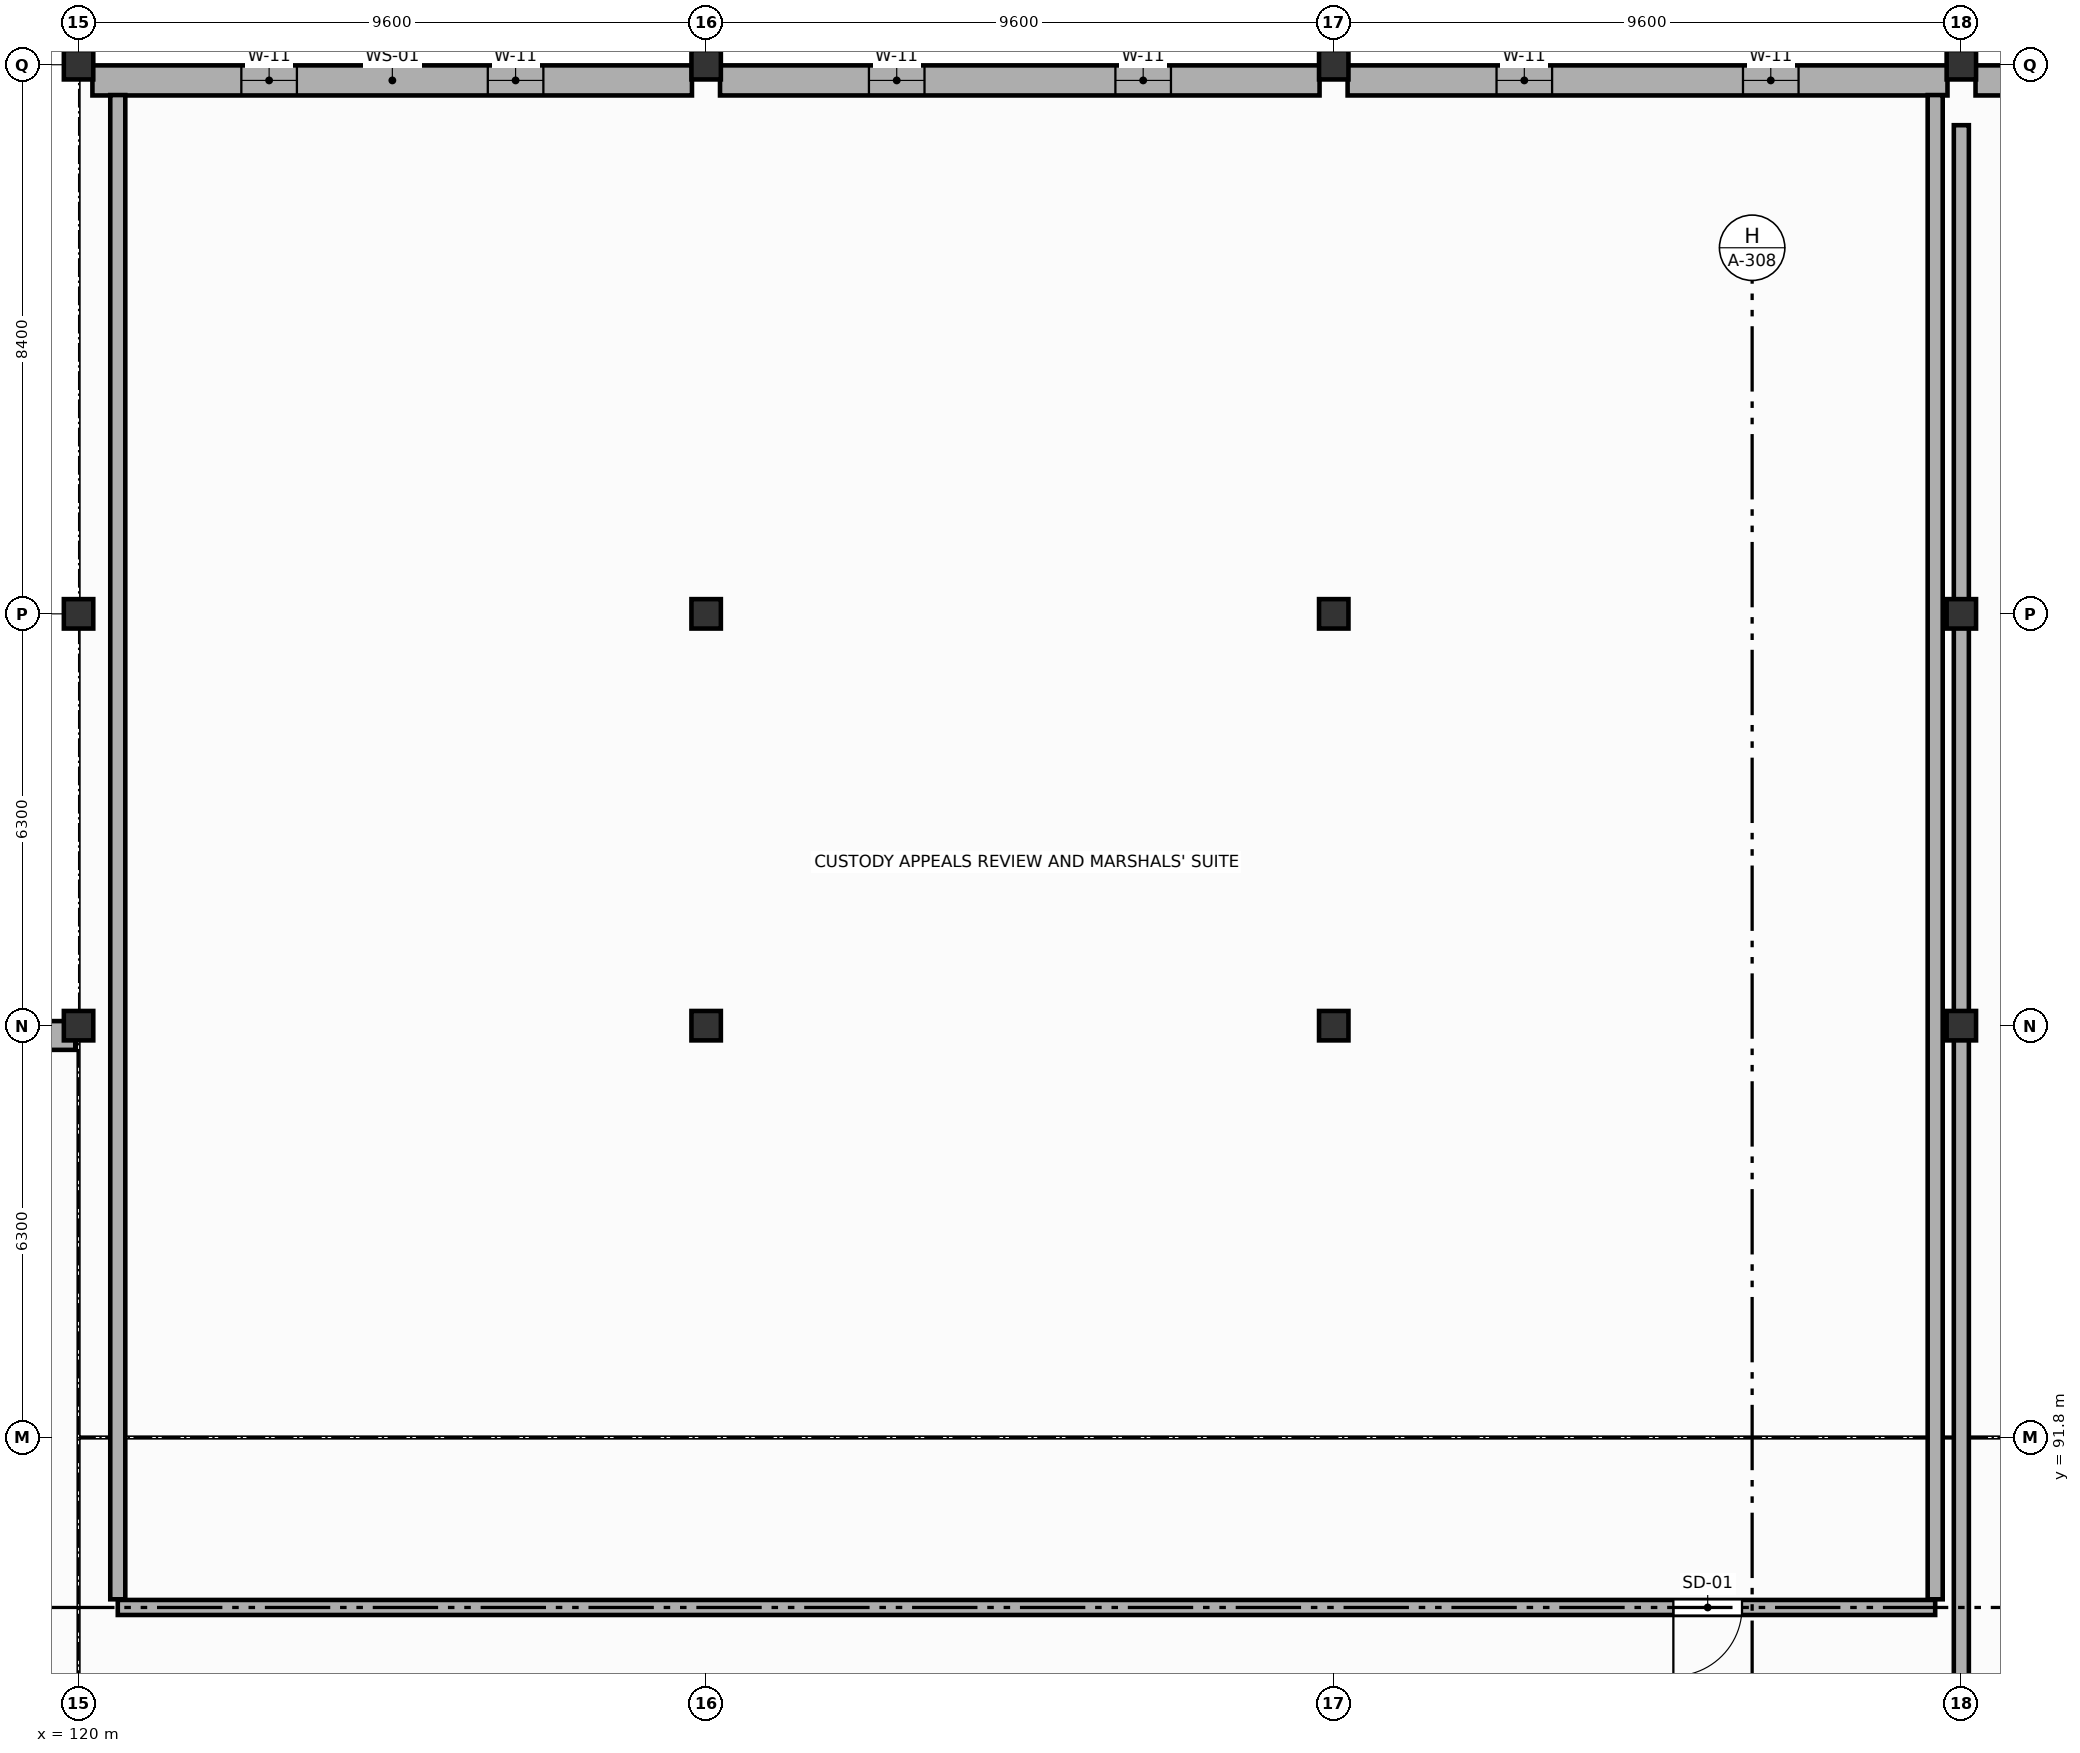
"""IFC4 building model, lengths in metres.
Left out: names, types, materials, properties, quantities, classifications, styles, units other than length and angle.
Written with IfcOpenShell. Run it as: python <this file> out.ifc"""

import sys

from ifc_helpers import new_model, si_unit, direction, frame, frame_2d, origin, origin_2d, place, context, subcontext, project, spatial, rectangle, extrude, element, fill, save


model = new_model("IFC4")
c1 = context("Model", 3, precision=1e-05, world=origin(), true_north=direction((0.0, 1.0)))
c2 = subcontext(c1, "Body", "Model", "MODEL_VIEW")
j1 = project(units=[si_unit("LENGTHUNIT", "METRE"), si_unit("PLANEANGLEUNIT", "RADIAN")], contexts=[c1])
p1 = place(None, origin())
s1 = spatial("IfcSite", under=j1, at=p1, CompositionType="ELEMENT")
p2 = place(p1, origin())
s2 = spatial("IfcBuilding", under=s1, at=p2, CompositionType="ELEMENT")
p3 = place(p2, frame((0.0, 0.0, 9.9)))
s3 = spatial("IfcBuildingStorey", under=s2, at=p3, CompositionType="ELEMENT", Elevation=9.9)
for number, where, z_axis, x_axis in (
    (1, (120.0, 98.1, 0.0), (0.0, 0.0, 1.0), (1.0, 0.0, 0.0)),
    (2, (120.0, 104.4, 0.0), (0.0, 0.0, 1.0), (1.0, 0.0, 0.0)),
    (3, (120.0, 112.8, 0.0), (0.0, 0.0, 1.0), (1.0, 0.0, 0.0)),
    (4, (129.6, 98.1, 0.0), (0.0, 0.0, 1.0), (1.0, 0.0, 0.0)),
    (5, (129.6, 104.4, 0.0), (0.0, 0.0, 1.0), (1.0, 0.0, 0.0)),
    (6, (129.6, 112.8, 0.0), (0.0, 0.0, 1.0), (1.0, 0.0, 0.0)),
    (7, (139.2, 98.1, 0.0), (0.0, 0.0, 1.0), (1.0, 0.0, 0.0)),
    (8, (139.2, 104.4, 0.0), (0.0, 0.0, 1.0), (1.0, 0.0, 0.0)),
    (9, (139.2, 112.8, 0.0), (0.0, 0.0, 1.0), (1.0, 0.0, 0.0)),
    (10, (148.8, 98.1, 0.0), (0.0, 0.0, 1.0), (1.0, 0.0, 0.0)),
    (11, (148.8, 104.4, 0.0), (0.0, 0.0, 1.0), (1.0, 0.0, 0.0)),
    (12, (148.8, 112.8, 0.0), (0.0, 0.0, 1.0), (1.0, 0.0, 0.0)),
):
    element("IfcColumn", number, at=place(p3, frame(where, z_axis=z_axis, x_axis=x_axis)), inside=s3, PredefinedType="COLUMN", context=c2, shape_type="SweptSolid", body=[
        extrude(rectangle(XDim=0.45, YDim=0.45, at=origin_2d()), origin(), (0.0, 0.0, 1.0), 4.5),
    ])
p4 = place(p3, frame((120.212, 112.56, 0.0), z_axis=(0.0, 0.0, 1.0), x_axis=(1.0, 0.0, 0.0)))
e13 = element("IfcWall", 13, at=p4, inside=s3, PredefinedType="STANDARD", context=c2, shape_type="SweptSolid", body=[
    extrude(rectangle(XDim=9.171, YDim=0.46, at=frame_2d((4.585, 0.0))), origin(), (0.0, 0.0, 1.0), 3.73),
])
p5 = place(p4, frame((2.278, 0.0, 2.15)))
e14 = element("IfcOpeningElement", 14, at=p5, cuts=e13, PredefinedType="OPENING", context=c2, shape_type="SweptSolid", body=[
    extrude(rectangle(XDim=0.85, YDim=0.9, at=frame_2d((0.425, 0.45))), frame((0.0, 0.24, 0.0), z_axis=(0.0, -1.0, 0.0), x_axis=(1.0, 0.0, 0.0)), (0.0, 0.0, 1.0), 0.48),
])
p6 = place(p4, frame((6.048, 0.0, 2.15)))
e15 = element("IfcOpeningElement", 15, at=p6, cuts=e13, PredefinedType="OPENING", context=c2, shape_type="SweptSolid", body=[
    extrude(rectangle(XDim=0.85, YDim=0.9, at=frame_2d((0.425, 0.45))), frame((0.0, 0.24, 0.0), z_axis=(0.0, -1.0, 0.0), x_axis=(1.0, 0.0, 0.0)), (0.0, 0.0, 1.0), 0.48),
])
p7 = place(p3, frame((129.812, 112.56, 0.0), z_axis=(0.0, 0.0, 1.0), x_axis=(1.0, 0.0, 0.0)))
e16 = element("IfcWall", 16, at=p7, inside=s3, PredefinedType="STANDARD", context=c2, shape_type="SweptSolid", body=[
    extrude(rectangle(XDim=9.171, YDim=0.46, at=frame_2d((4.585, 0.0))), origin(), (0.0, 0.0, 1.0), 3.73),
])
p8 = place(p7, frame((2.278, 0.0, 2.15)))
e17 = element("IfcOpeningElement", 17, at=p8, cuts=e16, PredefinedType="OPENING", context=c2, shape_type="SweptSolid", body=[
    extrude(rectangle(XDim=0.85, YDim=0.9, at=frame_2d((0.425, 0.45))), frame((0.0, 0.24, 0.0), z_axis=(0.0, -1.0, 0.0), x_axis=(1.0, 0.0, 0.0)), (0.0, 0.0, 1.0), 0.48),
])
p9 = place(p7, frame((6.048, 0.0, 2.15)))
e18 = element("IfcOpeningElement", 18, at=p9, cuts=e16, PredefinedType="OPENING", context=c2, shape_type="SweptSolid", body=[
    extrude(rectangle(XDim=0.85, YDim=0.9, at=frame_2d((0.425, 0.45))), frame((0.0, 0.24, 0.0), z_axis=(0.0, -1.0, 0.0), x_axis=(1.0, 0.0, 0.0)), (0.0, 0.0, 1.0), 0.48),
])
p10 = place(p3, frame((139.412, 112.56, 0.0), z_axis=(0.0, 0.0, 1.0), x_axis=(1.0, 0.0, 0.0)))
e19 = element("IfcWall", 19, at=p10, inside=s3, PredefinedType="STANDARD", context=c2, shape_type="SweptSolid", body=[
    extrude(rectangle(XDim=9.176, YDim=0.46, at=frame_2d((4.588, 0.0))), origin(), (0.0, 0.0, 1.0), 3.73),
])
p11 = place(p10, frame((2.278, 0.0, 2.15)))
e20 = element("IfcOpeningElement", 20, at=p11, cuts=e19, PredefinedType="OPENING", context=c2, shape_type="SweptSolid", body=[
    extrude(rectangle(XDim=0.85, YDim=0.9, at=frame_2d((0.425, 0.45))), frame((0.0, 0.24, 0.0), z_axis=(0.0, -1.0, 0.0), x_axis=(1.0, 0.0, 0.0)), (0.0, 0.0, 1.0), 0.48),
])
p12 = place(p10, frame((6.048, 0.0, 2.15)))
e21 = element("IfcOpeningElement", 21, at=p12, cuts=e19, PredefinedType="OPENING", context=c2, shape_type="SweptSolid", body=[
    extrude(rectangle(XDim=0.85, YDim=0.9, at=frame_2d((0.425, 0.45))), frame((0.0, 0.24, 0.0), z_axis=(0.0, -1.0, 0.0), x_axis=(1.0, 0.0, 0.0)), (0.0, 0.0, 1.0), 0.48),
])
p13 = place(p3, frame((149.017, 112.56, 0.0), z_axis=(0.0, 0.0, 1.0), x_axis=(1.0, 0.0, 0.0)))
e22 = element("IfcWall", 22, at=p13, inside=s3, PredefinedType="STANDARD", context=c2, shape_type="SweptSolid", body=[
    extrude(rectangle(XDim=12.766, YDim=0.46, at=frame_2d((6.383, 0.0))), origin(), (0.0, 0.0, 1.0), 3.73),
])
p14 = place(p13, frame((3.173, 0.0, 2.15)))
e23 = element("IfcOpeningElement", 23, at=p14, cuts=e22, PredefinedType="OPENING", context=c2, shape_type="SweptSolid", body=[
    extrude(rectangle(XDim=0.85, YDim=0.9, at=frame_2d((0.425, 0.45))), frame((0.0, 0.24, 0.0), z_axis=(0.0, -1.0, 0.0), x_axis=(1.0, 0.0, 0.0)), (0.0, 0.0, 1.0), 0.48),
])
p15 = place(p13, frame((8.743, 0.0, 2.15)))
e24 = element("IfcOpeningElement", 24, at=p15, cuts=e22, PredefinedType="OPENING", context=c2, shape_type="SweptSolid", body=[
    extrude(rectangle(XDim=0.85, YDim=0.9, at=frame_2d((0.425, 0.45))), frame((0.0, 0.24, 0.0), z_axis=(0.0, -1.0, 0.0), x_axis=(1.0, 0.0, 0.0)), (0.0, 0.0, 1.0), 0.48),
])
p16 = place(p3, frame((112.85, 97.95, 0.0), z_axis=(0.0, 0.0, 1.0), x_axis=(1.0, 0.0, 0.0)))
e25 = element("IfcWall", 25, at=p16, inside=s3, PredefinedType="STANDARD", context=c2, shape_type="SweptSolid", body=[
    extrude(rectangle(XDim=7.1, YDim=0.44, at=frame_2d((3.55, 0.0))), origin(), (0.0, 0.0, 1.0), 3.38),
])
p17 = place(p3, frame((148.8, 67.925, 0.0), z_axis=(0.0, 0.0, 1.0), x_axis=(0.0, 1.0, 0.0)))
e26 = element("IfcWall", 26, at=p17, inside=s3, PredefinedType="STANDARD", context=c2, shape_type="SweptSolid", body=[
    extrude(rectangle(XDim=43.95, YDim=0.23, at=frame_2d((21.975, 0.0))), origin(), (0.0, 0.0, 1.0), 3.38),
])
p18 = place(p17, frame((2.46, 0.0, 0.0)))
e27 = element("IfcOpeningElement", 27, at=p18, cuts=e26, PredefinedType="OPENING", context=c2, shape_type="SweptSolid", body=[
    extrude(rectangle(XDim=1.05, YDim=2.15, at=frame_2d((0.525, 1.075))), frame((0.0, 0.125, 0.0), z_axis=(0.0, -1.0, 0.0), x_axis=(1.0, 0.0, 0.0)), (0.0, 0.0, 1.0), 0.25),
])
p19 = place(p3, frame((148.4, 89.2, 0.0), z_axis=(0.0, 0.0, 1.0), x_axis=(-1.0, 0.0, 0.0)))
e28 = element("IfcWall", 28, at=p19, inside=s3, PredefinedType="STANDARD", context=c2, shape_type="SweptSolid", body=[
    extrude(rectangle(XDim=27.8, YDim=0.23, at=frame_2d((13.9, 0.0))), origin(), (0.0, 0.0, 1.0), 3.38),
])
p20 = place(p19, frame((2.955, 0.0, 0.0)))
e29 = element("IfcOpeningElement", 29, at=p20, cuts=e28, PredefinedType="OPENING", context=c2, shape_type="SweptSolid", body=[
    extrude(rectangle(XDim=1.05, YDim=2.15, at=frame_2d((0.525, 1.075))), frame((0.0, 0.125, 0.0), z_axis=(0.0, -1.0, 0.0), x_axis=(1.0, 0.0, 0.0)), (0.0, 0.0, 1.0), 0.25),
])
p21 = place(p3, frame((120.6, 89.325, 0.0), z_axis=(0.0, 0.0, 1.0), x_axis=(0.0, 1.0, 0.0)))
e30 = element("IfcWall", 30, at=p21, inside=s3, PredefinedType="STANDARD", context=c2, shape_type="SweptSolid", body=[
    extrude(rectangle(XDim=23.011, YDim=0.23, at=frame_2d((11.505, 0.0))), origin(), (0.0, 0.0, 1.0), 3.58),
])
p22 = place(p3, frame((148.4, 112.336, 0.0), z_axis=(0.0, 0.0, 1.0), x_axis=(0.0, -1.0, 0.0)))
e31 = element("IfcWall", 31, at=p22, inside=s3, PredefinedType="STANDARD", context=c2, shape_type="SweptSolid", body=[
    extrude(rectangle(XDim=23.011, YDim=0.23, at=frame_2d((11.505, 0.0))), origin(), (0.0, 0.0, 1.0), 3.38),
])
p23 = place(p5, origin())
e32 = element("IfcWindow", 32, at=p23, inside=s3, PartitioningType="SINGLE_PANEL", PredefinedType="WINDOW", context=c2, shape_type="SweptSolid", body=[
    extrude(rectangle(XDim=0.85, YDim=0.9, at=frame_2d((0.425, 0.45))), frame((0.0, 0.03, 0.0), z_axis=(0.0, -1.0, 0.0), x_axis=(1.0, 0.0, 0.0)), (0.0, 0.0, 1.0), 0.06),
])
fill(e14, e32)
p24 = place(p6, origin())
e33 = element("IfcWindow", 33, at=p24, inside=s3, PartitioningType="SINGLE_PANEL", PredefinedType="WINDOW", context=c2, shape_type="SweptSolid", body=[
    extrude(rectangle(XDim=0.85, YDim=0.9, at=frame_2d((0.425, 0.45))), frame((0.0, 0.03, 0.0), z_axis=(0.0, -1.0, 0.0), x_axis=(1.0, 0.0, 0.0)), (0.0, 0.0, 1.0), 0.06),
])
fill(e15, e33)
p25 = place(p8, origin())
e34 = element("IfcWindow", 34, at=p25, inside=s3, PartitioningType="SINGLE_PANEL", PredefinedType="WINDOW", context=c2, shape_type="SweptSolid", body=[
    extrude(rectangle(XDim=0.85, YDim=0.9, at=frame_2d((0.425, 0.45))), frame((0.0, 0.03, 0.0), z_axis=(0.0, -1.0, 0.0), x_axis=(1.0, 0.0, 0.0)), (0.0, 0.0, 1.0), 0.06),
])
fill(e17, e34)
p26 = place(p9, origin())
e35 = element("IfcWindow", 35, at=p26, inside=s3, PartitioningType="SINGLE_PANEL", PredefinedType="WINDOW", context=c2, shape_type="SweptSolid", body=[
    extrude(rectangle(XDim=0.85, YDim=0.9, at=frame_2d((0.425, 0.45))), frame((0.0, 0.03, 0.0), z_axis=(0.0, -1.0, 0.0), x_axis=(1.0, 0.0, 0.0)), (0.0, 0.0, 1.0), 0.06),
])
fill(e18, e35)
p27 = place(p11, origin())
e36 = element("IfcWindow", 36, at=p27, inside=s3, PartitioningType="SINGLE_PANEL", PredefinedType="WINDOW", context=c2, shape_type="SweptSolid", body=[
    extrude(rectangle(XDim=0.85, YDim=0.9, at=frame_2d((0.425, 0.45))), frame((0.0, 0.03, 0.0), z_axis=(0.0, -1.0, 0.0), x_axis=(1.0, 0.0, 0.0)), (0.0, 0.0, 1.0), 0.06),
])
fill(e20, e36)
p28 = place(p12, origin())
e37 = element("IfcWindow", 37, at=p28, inside=s3, PartitioningType="SINGLE_PANEL", PredefinedType="WINDOW", context=c2, shape_type="SweptSolid", body=[
    extrude(rectangle(XDim=0.85, YDim=0.9, at=frame_2d((0.425, 0.45))), frame((0.0, 0.03, 0.0), z_axis=(0.0, -1.0, 0.0), x_axis=(1.0, 0.0, 0.0)), (0.0, 0.0, 1.0), 0.06),
])
fill(e21, e37)
p29 = place(p20, origin())
e38 = element("IfcDoor", 38, at=p29, inside=s3, OperationType="SINGLE_SWING_RIGHT", PredefinedType="DOOR", context=c2, shape_type="SweptSolid", body=[
    extrude(rectangle(XDim=1.05, YDim=2.15, at=frame_2d((0.525, 1.075))), frame((0.0, 0.025, 0.0), z_axis=(0.0, -1.0, 0.0), x_axis=(1.0, 0.0, 0.0)), (0.0, 0.0, 1.0), 0.05),
])
fill(e29, e38)
save(model, sys.argv[1])
